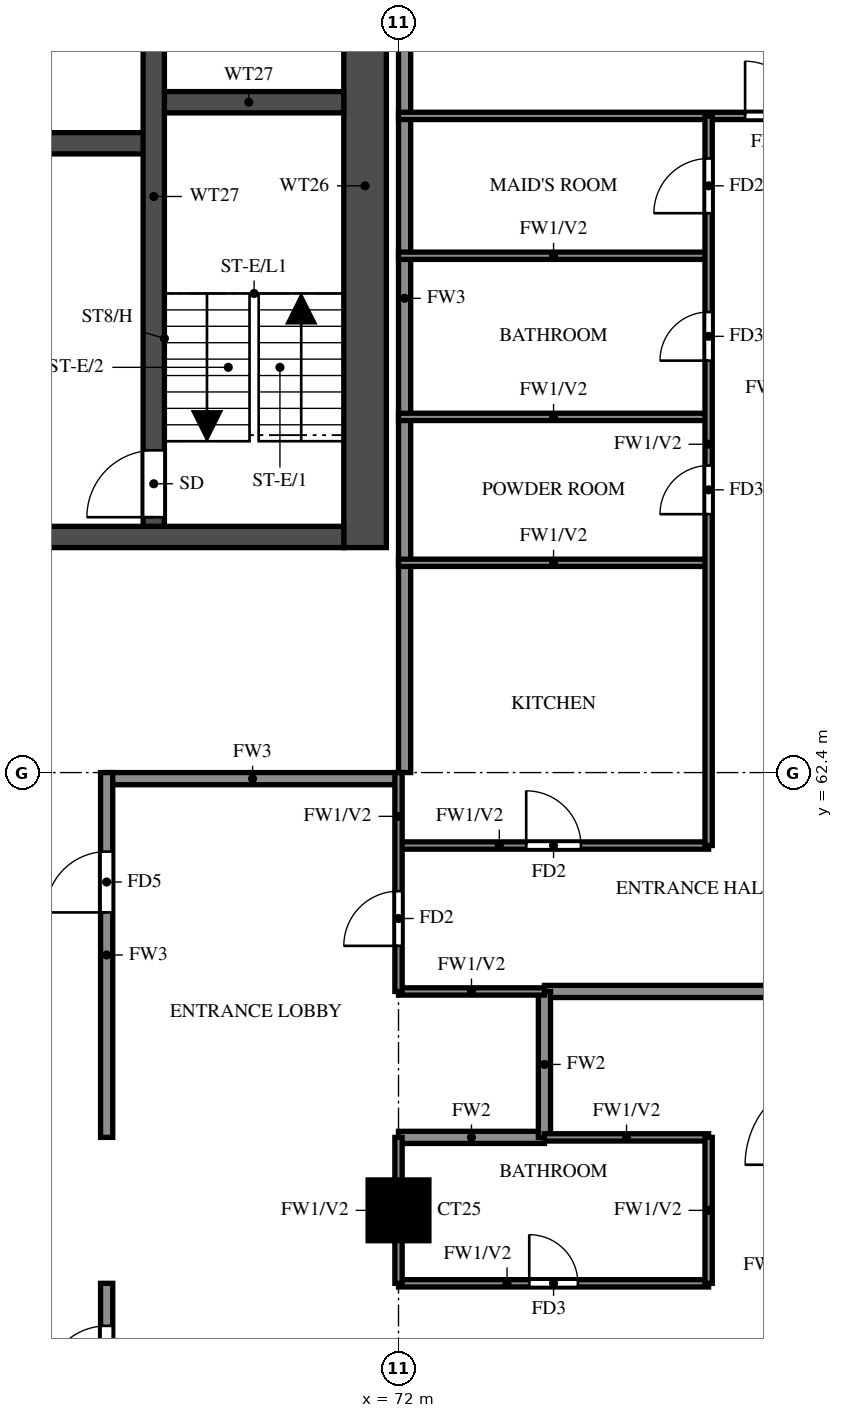
"""IFC4 building model, lengths in metres.
Left out: names, types, materials, properties, quantities, classifications, styles, units other than length and angle.
Written with IfcOpenShell. Run it as: python <this file> out.ifc"""

import sys

from ifc_helpers import new_model, si_unit, direction, frame, frame_2d, origin, origin_2d, place, context, subcontext, project, spatial, rectangle, extrude, source, transform, mapped, element, fill, save


model = new_model("IFC4")
c1 = context("Model", 3, precision=1e-05, world=origin(), true_north=direction((0.0, 1.0)))
c2 = subcontext(c1, "Body", "Model", "MODEL_VIEW")
j1 = project(units=[si_unit("LENGTHUNIT", "METRE"), si_unit("PLANEANGLEUNIT", "RADIAN")], contexts=[c1])
p1 = place(None, origin())
s1 = spatial("IfcSite", under=j1, at=p1, CompositionType="ELEMENT")
p2 = place(p1, origin())
s2 = spatial("IfcBuilding", under=s1, at=p2, CompositionType="ELEMENT")
p3 = place(p2, frame((0.0, 0.0, 150.0)))
s3 = spatial("IfcBuildingStorey", under=s2, at=p3, CompositionType="ELEMENT", Elevation=150.0)
m1 = source(origin(), c2, "Body", "SweptSolid", [
    extrude(rectangle(XDim=1.0, YDim=1.0, at=origin_2d()), origin(), (0.0, 0.0, 1.0), 3.2),
])
p4 = place(p3, frame((72.0, 55.2, 0.0), z_axis=(0.0, 0.0, 1.0), x_axis=(1.0, 0.0, 0.0)))
e1 = element("IfcColumn", 1, at=p4, inside=s3, PredefinedType="COLUMN", context=c2, shape_type="MappedRepresentation", body=[
    mapped(m1, transform((0.0, 0.0, 0.0))),
])
p5 = place(p3, frame((71.45, 66.1, 0.0), z_axis=(0.0, 0.0, 1.0), x_axis=(0.0, 1.0, 0.0)))
e2 = element("IfcWall", 2, at=p5, inside=s3, PredefinedType="SHEAR", context=c2, shape_type="SweptSolid", body=[
    extrude(rectangle(XDim=11.9, YDim=0.7, at=frame_2d((5.95, 0.0))), origin(), (0.0, 0.0, 1.0), 3.2),
])
p6 = place(p3, frame((29.7, 66.275, 0.0), z_axis=(0.0, 0.0, 1.0), x_axis=(1.0, 0.0, 0.0)))
e3 = element("IfcWall", 3, at=p6, inside=s3, PredefinedType="SHEAR", context=c2, shape_type="SweptSolid", body=[
    extrude(rectangle(XDim=41.4, YDim=0.35, at=frame_2d((20.7, 0.0))), origin(), (0.0, 0.0, 1.0), 3.2),
])
p7 = place(p6, frame((0.925, 0.0, 0.0)))
e4 = element("IfcOpeningElement", 4, at=p7, cuts=e3, PredefinedType="OPENING", context=c2, shape_type="SweptSolid", body=[
    extrude(rectangle(XDim=1.1, YDim=2.1, at=frame_2d((0.55, 1.05))), frame((0.0, 0.185, 0.0), z_axis=(0.0, -1.0, 0.0), x_axis=(1.0, 0.0, 0.0)), (0.0, 0.0, 1.0), 0.37),
])
p8 = place(p6, frame((3.712, 0.0, 0.0)))
e5 = element("IfcOpeningElement", 5, at=p8, cuts=e3, PredefinedType="OPENING", context=c2, shape_type="SweptSolid", body=[
    extrude(rectangle(XDim=1.8, YDim=2.1, at=frame_2d((0.9, 1.05))), frame((0.0, 0.185, 0.0), z_axis=(0.0, -1.0, 0.0), x_axis=(1.0, 0.0, 0.0)), (0.0, 0.0, 1.0), 0.37),
])
p9 = place(p3, frame((32.825, 72.75, 0.0), z_axis=(0.0, 0.0, 1.0), x_axis=(1.0, 0.0, 0.0)))
e6 = element("IfcWall", 6, at=p9, inside=s3, PredefinedType="SHEAR", context=c2, shape_type="SweptSolid", body=[
    extrude(rectangle(XDim=35.15, YDim=0.35, at=frame_2d((17.575, 0.0))), origin(), (0.0, 0.0, 1.0), 3.2),
])
p10 = place(p9, frame((19.8, 0.0, 0.0)))
e7 = element("IfcOpeningElement", 7, at=p10, cuts=e6, PredefinedType="OPENING", context=c2, shape_type="SweptSolid", body=[
    extrude(rectangle(XDim=1.1, YDim=2.1, at=frame_2d((0.55, 1.05))), frame((0.0, 0.185, 0.0), z_axis=(0.0, -1.0, 0.0), x_axis=(1.0, 0.0, 0.0)), (0.0, 0.0, 1.0), 0.37),
])
p11 = place(p9, frame((27.7, 0.0, 0.0)))
e8 = element("IfcOpeningElement", 8, at=p11, cuts=e6, PredefinedType="OPENING", context=c2, shape_type="SweptSolid", body=[
    extrude(rectangle(XDim=1.1, YDim=2.1, at=frame_2d((0.55, 1.05))), frame((0.0, 0.185, 0.0), z_axis=(0.0, -1.0, 0.0), x_axis=(1.0, 0.0, 0.0)), (0.0, 0.0, 1.0), 0.37),
])
p12 = place(p9, frame((30.3, 0.0, 0.0)))
e9 = element("IfcOpeningElement", 9, at=p12, cuts=e6, PredefinedType="OPENING", context=c2, shape_type="SweptSolid", body=[
    extrude(rectangle(XDim=1.1, YDim=2.1, at=frame_2d((0.55, 1.05))), frame((0.0, 0.185, 0.0), z_axis=(0.0, -1.0, 0.0), x_axis=(1.0, 0.0, 0.0)), (0.0, 0.0, 1.0), 0.37),
])
p13 = place(p9, frame((3.8, 0.0, 0.0)))
e10 = element("IfcOpeningElement", 10, at=p13, cuts=e6, PredefinedType="OPENING", context=c2, shape_type="SweptSolid", body=[
    extrude(rectangle(XDim=1.1, YDim=2.1, at=frame_2d((0.55, 1.05))), frame((0.0, 0.185, 0.0), z_axis=(0.0, -1.0, 0.0), x_axis=(1.0, 0.0, 0.0)), (0.0, 0.0, 1.0), 0.37),
])
p14 = place(p9, frame((6.55, 0.0, 0.0)))
e11 = element("IfcOpeningElement", 11, at=p14, cuts=e6, PredefinedType="OPENING", context=c2, shape_type="SweptSolid", body=[
    extrude(rectangle(XDim=1.1, YDim=2.1, at=frame_2d((0.55, 1.05))), frame((0.0, 0.185, 0.0), z_axis=(0.0, -1.0, 0.0), x_axis=(1.0, 0.0, 0.0)), (0.0, 0.0, 1.0), 0.37),
])
p15 = place(p9, frame((9.3, 0.0, 0.0)))
e12 = element("IfcOpeningElement", 12, at=p15, cuts=e6, PredefinedType="OPENING", context=c2, shape_type="SweptSolid", body=[
    extrude(rectangle(XDim=1.1, YDim=2.1, at=frame_2d((0.55, 1.05))), frame((0.0, 0.185, 0.0), z_axis=(0.0, -1.0, 0.0), x_axis=(1.0, 0.0, 0.0)), (0.0, 0.0, 1.0), 0.37),
])
p16 = place(p9, frame((12.05, 0.0, 0.0)))
e13 = element("IfcOpeningElement", 13, at=p16, cuts=e6, PredefinedType="OPENING", context=c2, shape_type="SweptSolid", body=[
    extrude(rectangle(XDim=1.1, YDim=2.1, at=frame_2d((0.55, 1.05))), frame((0.0, 0.185, 0.0), z_axis=(0.0, -1.0, 0.0), x_axis=(1.0, 0.0, 0.0)), (0.0, 0.0, 1.0), 0.37),
])
p17 = place(p9, frame((14.8, 0.0, 0.0)))
e14 = element("IfcOpeningElement", 14, at=p17, cuts=e6, PredefinedType="OPENING", context=c2, shape_type="SweptSolid", body=[
    extrude(rectangle(XDim=1.1, YDim=2.1, at=frame_2d((0.55, 1.05))), frame((0.0, 0.185, 0.0), z_axis=(0.0, -1.0, 0.0), x_axis=(1.0, 0.0, 0.0)), (0.0, 0.0, 1.0), 0.37),
])
p18 = place(p9, frame((17.55, 0.0, 0.0)))
e15 = element("IfcOpeningElement", 15, at=p18, cuts=e6, PredefinedType="OPENING", context=c2, shape_type="SweptSolid", body=[
    extrude(rectangle(XDim=1.1, YDim=2.1, at=frame_2d((0.55, 1.05))), frame((0.0, 0.185, 0.0), z_axis=(0.0, -1.0, 0.0), x_axis=(1.0, 0.0, 0.0)), (0.0, 0.0, 1.0), 0.37),
])
p19 = place(p9, frame((0.938, 0.0, 0.0)))
e16 = element("IfcOpeningElement", 16, at=p19, cuts=e6, PredefinedType="OPENING", context=c2, shape_type="SweptSolid", body=[
    extrude(rectangle(XDim=1.1, YDim=2.1, at=frame_2d((0.55, 1.05))), frame((0.0, 0.185, 0.0), z_axis=(0.0, -1.0, 0.0), x_axis=(1.0, 0.0, 0.0)), (0.0, 0.0, 1.0), 0.37),
])
p20 = place(p3, frame((67.975, 73.425, 0.0), z_axis=(0.0, 0.0, 1.0), x_axis=(1.0, 0.0, 0.0)))
e17 = element("IfcWall", 17, at=p20, inside=s3, PredefinedType="SHEAR", context=c2, shape_type="SweptSolid", body=[
    extrude(rectangle(XDim=3.125, YDim=0.35, at=frame_2d((1.562, 0.0))), origin(), (0.0, 0.0, 1.0), 3.2),
])
p21 = place(p3, frame((67.975, 66.45, 0.0), z_axis=(0.0, 0.0, 1.0), x_axis=(0.0, 1.0, 0.0)))
e18 = element("IfcWall", 18, at=p21, inside=s3, PredefinedType="SHEAR", context=c2, shape_type="SweptSolid", body=[
    extrude(rectangle(XDim=10.85, YDim=0.35, at=frame_2d((5.425, 0.0))), origin(), (0.0, 0.0, 1.0), 3.2),
])
p22 = place(p21, frame((0.15, 0.0, 0.0)))
e19 = element("IfcOpeningElement", 19, at=p22, cuts=e18, PredefinedType="OPENING", context=c2, shape_type="SweptSolid", body=[
    extrude(rectangle(XDim=1.1, YDim=2.1, at=frame_2d((0.55, 1.05))), frame((0.0, 0.185, 0.0), z_axis=(0.0, -1.0, 0.0), x_axis=(1.0, 0.0, 0.0)), (0.0, 0.0, 1.0), 0.37),
])
p23 = place(p3, frame((67.2, 62.3, 0.0), z_axis=(0.0, 0.0, 1.0), x_axis=(1.0, 0.0, 0.0)))
e20 = element("IfcWall", 20, at=p23, inside=s3, PredefinedType="SOLIDWALL", context=c2, shape_type="SweptSolid", body=[
    extrude(rectangle(XDim=4.8, YDim=0.2, at=frame_2d((2.4, 0.0))), origin(), (0.0, 0.0, 1.0), 3.2),
])
p24 = place(p3, frame((67.2, 45.6, 0.0), z_axis=(0.0, 0.0, 1.0), x_axis=(0.0, 1.0, 0.0)))
e21 = element("IfcWall", 21, at=p24, inside=s3, PredefinedType="SOLIDWALL", context=c2, shape_type="SweptSolid", body=[
    extrude(rectangle(XDim=8.4, YDim=0.2, at=frame_2d((4.2, 0.0))), origin(), (0.0, 0.0, 1.0), 3.2),
])
p25 = place(p24, frame((6.7, 0.0, 0.0)))
e22 = element("IfcOpeningElement", 22, at=p25, cuts=e21, PredefinedType="OPENING", context=c2, shape_type="SweptSolid", body=[
    extrude(rectangle(XDim=1.0, YDim=2.1, at=frame_2d((0.5, 1.05))), frame((0.0, 0.11, 0.0), z_axis=(0.0, -1.0, 0.0), x_axis=(1.0, 0.0, 0.0)), (0.0, 0.0, 1.0), 0.22),
])
p26 = place(p24, frame((0.7, 0.0, 0.0)))
e23 = element("IfcOpeningElement", 23, at=p26, cuts=e21, PredefinedType="OPENING", context=c2, shape_type="SweptSolid", body=[
    extrude(rectangle(XDim=1.0, YDim=2.1, at=frame_2d((0.5, 1.05))), frame((0.0, 0.11, 0.0), z_axis=(0.0, -1.0, 0.0), x_axis=(1.0, 0.0, 0.0)), (0.0, 0.0, 1.0), 0.22),
])
p27 = place(p3, frame((67.2, 56.4, 0.0), z_axis=(0.0, 0.0, 1.0), x_axis=(0.0, 1.0, 0.0)))
e24 = element("IfcWall", 24, at=p27, inside=s3, PredefinedType="SOLIDWALL", context=c2, shape_type="SweptSolid", body=[
    extrude(rectangle(XDim=6.0, YDim=0.2, at=frame_2d((3.0, 0.0))), origin(), (0.0, 0.0, 1.0), 3.2),
])
p28 = place(p27, frame((3.7, 0.0, 0.0)))
e25 = element("IfcOpeningElement", 25, at=p28, cuts=e24, PredefinedType="OPENING", context=c2, shape_type="SweptSolid", body=[
    extrude(rectangle(XDim=1.0, YDim=2.1, at=frame_2d((0.5, 1.05))), frame((0.0, 0.11, 0.0), z_axis=(0.0, -1.0, 0.0), x_axis=(1.0, 0.0, 0.0)), (0.0, 0.0, 1.0), 0.22),
])
p29 = place(p3, frame((72.1, 62.4, 0.0), z_axis=(0.0, 0.0, 1.0), x_axis=(0.0, 1.0, 0.0)))
e26 = element("IfcWall", 26, at=p29, inside=s3, PredefinedType="SOLIDWALL", context=c2, shape_type="SweptSolid", body=[
    extrude(rectangle(XDim=15.6, YDim=0.2, at=frame_2d((7.8, 0.0))), origin(), (0.0, 0.0, 1.0), 3.2),
])
p30 = place(p3, frame((72.0, 56.4, 0.0), z_axis=(0.0, 0.0, 1.0), x_axis=(1.0, 0.0, 0.0)))
e27 = element("IfcWall", 27, at=p30, inside=s3, PredefinedType="SOLIDWALL", context=c2, shape_type="SweptSolid", body=[
    extrude(rectangle(XDim=2.4, YDim=0.2, at=frame_2d((1.2, 0.0))), origin(), (0.0, 0.0, 1.0), 3.2),
])
p31 = place(p3, frame((74.4, 58.8, 0.0), z_axis=(0.0, 0.0, 1.0), x_axis=(1.0, 0.0, 0.0)))
e28 = element("IfcWall", 28, at=p31, inside=s3, PredefinedType="SOLIDWALL", context=c2, shape_type="SweptSolid", body=[
    extrude(rectangle(XDim=11.875, YDim=0.2, at=frame_2d((5.938, 0.0))), origin(), (0.0, 0.0, 1.0), 2.3),
])
p32 = place(p3, frame((74.4, 56.4, 0.0), z_axis=(0.0, 0.0, 1.0), x_axis=(0.0, 1.0, 0.0)))
e29 = element("IfcWall", 29, at=p32, inside=s3, PredefinedType="SOLIDWALL", context=c2, shape_type="SweptSolid", body=[
    extrude(rectangle(XDim=2.4, YDim=0.2, at=frame_2d((1.2, 0.0))), origin(), (0.0, 0.0, 1.0), 3.2),
])
p33 = place(p3, frame((72.0, 54.0, 0.0), z_axis=(0.0, 0.0, 1.0), x_axis=(1.0, 0.0, 0.0)))
e30 = element("IfcWall", 30, at=p33, inside=s3, PredefinedType="PARTITIONING", context=c2, shape_type="SweptSolid", body=[
    extrude(rectangle(XDim=5.1, YDim=0.12, at=frame_2d((2.55, 0.0))), origin(), (0.0, 0.0, 1.0), 3.2),
])
p34 = place(p33, frame((2.15, 0.0, 0.0)))
e31 = element("IfcOpeningElement", 31, at=p34, cuts=e30, PredefinedType="OPENING", context=c2, shape_type="SweptSolid", body=[
    extrude(rectangle(XDim=0.8, YDim=2.1, at=frame_2d((0.4, 1.05))), frame((0.0, 0.07, 0.0), z_axis=(0.0, -1.0, 0.0), x_axis=(1.0, 0.0, 0.0)), (0.0, 0.0, 1.0), 0.14),
])
p35 = place(p3, frame((74.4, 56.4, 0.0), z_axis=(0.0, 0.0, 1.0), x_axis=(1.0, 0.0, 0.0)))
e32 = element("IfcWall", 32, at=p35, inside=s3, PredefinedType="PARTITIONING", context=c2, shape_type="SweptSolid", body=[
    extrude(rectangle(XDim=2.7, YDim=0.12, at=frame_2d((1.35, 0.0))), origin(), (0.0, 0.0, 1.0), 3.2),
])
p36 = place(p3, frame((72.0, 58.8, 0.0), z_axis=(0.0, 0.0, 1.0), x_axis=(1.0, 0.0, 0.0)))
e33 = element("IfcWall", 33, at=p36, inside=s3, PredefinedType="PARTITIONING", context=c2, shape_type="SweptSolid", body=[
    extrude(rectangle(XDim=2.4, YDim=0.12, at=frame_2d((1.2, 0.0))), origin(), (0.0, 0.0, 1.0), 3.2),
])
p37 = place(p3, frame((72.0, 61.2, 0.0), z_axis=(0.0, 0.0, 1.0), x_axis=(1.0, 0.0, 0.0)))
e34 = element("IfcWall", 34, at=p37, inside=s3, PredefinedType="PARTITIONING", context=c2, shape_type="SweptSolid", body=[
    extrude(rectangle(XDim=5.1, YDim=0.12, at=frame_2d((2.55, 0.0))), origin(), (0.0, 0.0, 1.0), 3.2),
])
p38 = place(p37, frame((2.1, 0.0, 0.0)))
e35 = element("IfcOpeningElement", 35, at=p38, cuts=e34, PredefinedType="OPENING", context=c2, shape_type="SweptSolid", body=[
    extrude(rectangle(XDim=0.9, YDim=2.1, at=frame_2d((0.45, 1.05))), frame((0.0, 0.07, 0.0), z_axis=(0.0, -1.0, 0.0), x_axis=(1.0, 0.0, 0.0)), (0.0, 0.0, 1.0), 0.14),
])
for number, where, z_axis, x_axis in (
    (36, (72.0, 65.85, 0.0), (0.0, 0.0, 1.0), (1.0, 0.0, 0.0)),
    (37, (72.0, 68.25, 0.0), (0.0, 0.0, 1.0), (1.0, 0.0, 0.0)),
    (38, (72.0, 70.9, 0.0), (0.0, 0.0, 1.0), (1.0, 0.0, 0.0)),
):
    element("IfcWall", number, at=place(p3, frame(where, z_axis=z_axis, x_axis=x_axis)), inside=s3, PredefinedType="PARTITIONING", context=c2, shape_type="SweptSolid", body=[
        extrude(rectangle(XDim=5.1, YDim=0.12, at=frame_2d((2.55, 0.0))), origin(), (0.0, 0.0, 1.0), 3.2),
    ])
p39 = place(p3, frame((72.0, 73.2, 0.0), z_axis=(0.0, 0.0, 1.0), x_axis=(1.0, 0.0, 0.0)))
e39 = element("IfcWall", 39, at=p39, inside=s3, PredefinedType="PARTITIONING", context=c2, shape_type="SweptSolid", body=[
    extrude(rectangle(XDim=14.275, YDim=0.12, at=frame_2d((7.137, 0.0))), origin(), (0.0, 0.0, 1.0), 2.3),
])
p40 = place(p39, frame((5.7, 0.0, 0.0)))
e40 = element("IfcOpeningElement", 40, at=p40, cuts=e39, PredefinedType="OPENING", context=c2, shape_type="SweptSolid", body=[
    extrude(rectangle(XDim=0.9, YDim=2.1, at=frame_2d((0.45, 1.05))), frame((0.0, 0.07, 0.0), z_axis=(0.0, -1.0, 0.0), x_axis=(1.0, 0.0, 0.0)), (0.0, 0.0, 1.0), 0.14),
])
p41 = place(p3, frame((72.0, 54.0, 0.0), z_axis=(0.0, 0.0, 1.0), x_axis=(0.0, 1.0, 0.0)))
e41 = element("IfcWall", 41, at=p41, inside=s3, PredefinedType="PARTITIONING", context=c2, shape_type="SweptSolid", body=[
    extrude(rectangle(XDim=2.4, YDim=0.12, at=frame_2d((1.2, 0.0))), origin(), (0.0, 0.0, 1.0), 3.2),
])
p42 = place(p3, frame((72.0, 58.8, 0.0), z_axis=(0.0, 0.0, 1.0), x_axis=(0.0, 1.0, 0.0)))
e42 = element("IfcWall", 42, at=p42, inside=s3, PredefinedType="PARTITIONING", context=c2, shape_type="SweptSolid", body=[
    extrude(rectangle(XDim=3.6, YDim=0.12, at=frame_2d((1.8, 0.0))), origin(), (0.0, 0.0, 1.0), 3.2),
])
p43 = place(p42, frame((0.75, 0.0, 0.0)))
e43 = element("IfcOpeningElement", 43, at=p43, cuts=e42, PredefinedType="OPENING", context=c2, shape_type="SweptSolid", body=[
    extrude(rectangle(XDim=0.9, YDim=2.1, at=frame_2d((0.45, 1.05))), frame((0.0, 0.07, 0.0), z_axis=(0.0, -1.0, 0.0), x_axis=(1.0, 0.0, 0.0)), (0.0, 0.0, 1.0), 0.14),
])
p44 = place(p3, frame((77.1, 54.0, 0.0), z_axis=(0.0, 0.0, 1.0), x_axis=(0.0, 1.0, 0.0)))
e44 = element("IfcWall", 44, at=p44, inside=s3, PredefinedType="PARTITIONING", context=c2, shape_type="SweptSolid", body=[
    extrude(rectangle(XDim=2.4, YDim=0.12, at=frame_2d((1.2, 0.0))), origin(), (0.0, 0.0, 1.0), 3.2),
])
p45 = place(p3, frame((77.1, 61.2, 0.0), z_axis=(0.0, 0.0, 1.0), x_axis=(0.0, 1.0, 0.0)))
e45 = element("IfcWall", 45, at=p45, inside=s3, PredefinedType="PARTITIONING", context=c2, shape_type="SweptSolid", body=[
    extrude(rectangle(XDim=12.0, YDim=0.12, at=frame_2d((6.0, 0.0))), origin(), (0.0, 0.0, 1.0), 3.2),
])
p46 = place(p45, frame((5.45, 0.0, 0.0)))
e46 = element("IfcOpeningElement", 46, at=p46, cuts=e45, PredefinedType="OPENING", context=c2, shape_type="SweptSolid", body=[
    extrude(rectangle(XDim=0.8, YDim=2.1, at=frame_2d((0.4, 1.05))), frame((0.0, 0.07, 0.0), z_axis=(0.0, -1.0, 0.0), x_axis=(1.0, 0.0, 0.0)), (0.0, 0.0, 1.0), 0.14),
])
p47 = place(p45, frame((7.975, 0.0, 0.0)))
e47 = element("IfcOpeningElement", 47, at=p47, cuts=e45, PredefinedType="OPENING", context=c2, shape_type="SweptSolid", body=[
    extrude(rectangle(XDim=0.8, YDim=2.1, at=frame_2d((0.4, 1.05))), frame((0.0, 0.07, 0.0), z_axis=(0.0, -1.0, 0.0), x_axis=(1.0, 0.0, 0.0)), (0.0, 0.0, 1.0), 0.14),
])
p48 = place(p45, frame((10.4, 0.0, 0.0)))
e48 = element("IfcOpeningElement", 48, at=p48, cuts=e45, PredefinedType="OPENING", context=c2, shape_type="SweptSolid", body=[
    extrude(rectangle(XDim=0.9, YDim=2.1, at=frame_2d((0.45, 1.05))), frame((0.0, 0.07, 0.0), z_axis=(0.0, -1.0, 0.0), x_axis=(1.0, 0.0, 0.0)), (0.0, 0.0, 1.0), 0.14),
])
p49 = place(p22, origin())
e49 = element("IfcDoor", 49, at=p49, inside=s3, OperationType="SINGLE_SWING_LEFT", PredefinedType="DOOR", context=c2, shape_type="SweptSolid", body=[
    extrude(rectangle(XDim=1.1, YDim=2.1, at=frame_2d((0.55, 1.05))), frame((0.0, 0.025, 0.0), z_axis=(0.0, -1.0, 0.0), x_axis=(1.0, 0.0, 0.0)), (0.0, 0.0, 1.0), 0.05),
])
fill(e19, e49)
p50 = place(p25, origin())
e50 = element("IfcDoor", 50, at=p50, inside=s3, OperationType="SINGLE_SWING_RIGHT", PredefinedType="DOOR", context=c2, shape_type="SweptSolid", body=[
    extrude(rectangle(XDim=1.0, YDim=2.1, at=frame_2d((0.5, 1.05))), frame((0.0, 0.025, 0.0), z_axis=(0.0, -1.0, 0.0), x_axis=(1.0, 0.0, 0.0)), (0.0, 0.0, 1.0), 0.05),
])
fill(e22, e50)
p51 = place(p34, origin())
e51 = element("IfcDoor", 51, at=p51, inside=s3, OperationType="SINGLE_SWING_LEFT", PredefinedType="DOOR", context=c2, shape_type="SweptSolid", body=[
    extrude(rectangle(XDim=0.8, YDim=2.1, at=frame_2d((0.4, 1.05))), frame((0.0, 0.025, 0.0), z_axis=(0.0, -1.0, 0.0), x_axis=(1.0, 0.0, 0.0)), (0.0, 0.0, 1.0), 0.05),
])
fill(e31, e51)
p52 = place(p43, origin())
e52 = element("IfcDoor", 52, at=p52, inside=s3, OperationType="SINGLE_SWING_LEFT", PredefinedType="DOOR", context=c2, shape_type="SweptSolid", body=[
    extrude(rectangle(XDim=0.9, YDim=2.1, at=frame_2d((0.45, 1.05))), frame((0.0, 0.025, 0.0), z_axis=(0.0, -1.0, 0.0), x_axis=(1.0, 0.0, 0.0)), (0.0, 0.0, 1.0), 0.05),
])
fill(e43, e52)
p53 = place(p28, origin())
e53 = element("IfcDoor", 53, at=p53, inside=s3, OperationType="SINGLE_SWING_RIGHT", PredefinedType="DOOR", context=c2, shape_type="SweptSolid", body=[
    extrude(rectangle(XDim=1.0, YDim=2.1, at=frame_2d((0.5, 1.05))), frame((0.0, 0.025, 0.0), z_axis=(0.0, -1.0, 0.0), x_axis=(1.0, 0.0, 0.0)), (0.0, 0.0, 1.0), 0.05),
])
fill(e25, e53)
p54 = place(p40, origin())
e54 = element("IfcDoor", 54, at=p54, inside=s3, OperationType="SINGLE_SWING_LEFT", PredefinedType="DOOR", context=c2, shape_type="SweptSolid", body=[
    extrude(rectangle(XDim=0.9, YDim=2.1, at=frame_2d((0.45, 1.05))), frame((0.0, 0.025, 0.0), z_axis=(0.0, -1.0, 0.0), x_axis=(1.0, 0.0, 0.0)), (0.0, 0.0, 1.0), 0.05),
])
fill(e40, e54)
p55 = place(p38, origin())
e55 = element("IfcDoor", 55, at=p55, inside=s3, OperationType="SINGLE_SWING_RIGHT", PredefinedType="DOOR", context=c2, shape_type="SweptSolid", body=[
    extrude(rectangle(XDim=0.9, YDim=2.1, at=frame_2d((0.45, 1.05))), frame((0.0, 0.025, 0.0), z_axis=(0.0, -1.0, 0.0), x_axis=(1.0, 0.0, 0.0)), (0.0, 0.0, 1.0), 0.05),
])
fill(e35, e55)
p56 = place(p46, origin())
e56 = element("IfcDoor", 56, at=p56, inside=s3, OperationType="SINGLE_SWING_LEFT", PredefinedType="DOOR", context=c2, shape_type="SweptSolid", body=[
    extrude(rectangle(XDim=0.8, YDim=2.1, at=frame_2d((0.4, 1.05))), frame((0.0, 0.025, 0.0), z_axis=(0.0, -1.0, 0.0), x_axis=(1.0, 0.0, 0.0)), (0.0, 0.0, 1.0), 0.05),
])
fill(e46, e56)
p57 = place(p47, origin())
e57 = element("IfcDoor", 57, at=p57, inside=s3, OperationType="SINGLE_SWING_LEFT", PredefinedType="DOOR", context=c2, shape_type="SweptSolid", body=[
    extrude(rectangle(XDim=0.8, YDim=2.1, at=frame_2d((0.4, 1.05))), frame((0.0, 0.025, 0.0), z_axis=(0.0, -1.0, 0.0), x_axis=(1.0, 0.0, 0.0)), (0.0, 0.0, 1.0), 0.05),
])
fill(e47, e57)
p58 = place(p48, origin())
e58 = element("IfcDoor", 58, at=p58, inside=s3, OperationType="SINGLE_SWING_RIGHT", PredefinedType="DOOR", context=c2, shape_type="SweptSolid", body=[
    extrude(rectangle(XDim=0.9, YDim=2.1, at=frame_2d((0.45, 1.05))), frame((0.0, 0.025, 0.0), z_axis=(0.0, -1.0, 0.0), x_axis=(1.0, 0.0, 0.0)), (0.0, 0.0, 1.0), 0.05),
])
fill(e48, e58)
save(model, sys.argv[1])
